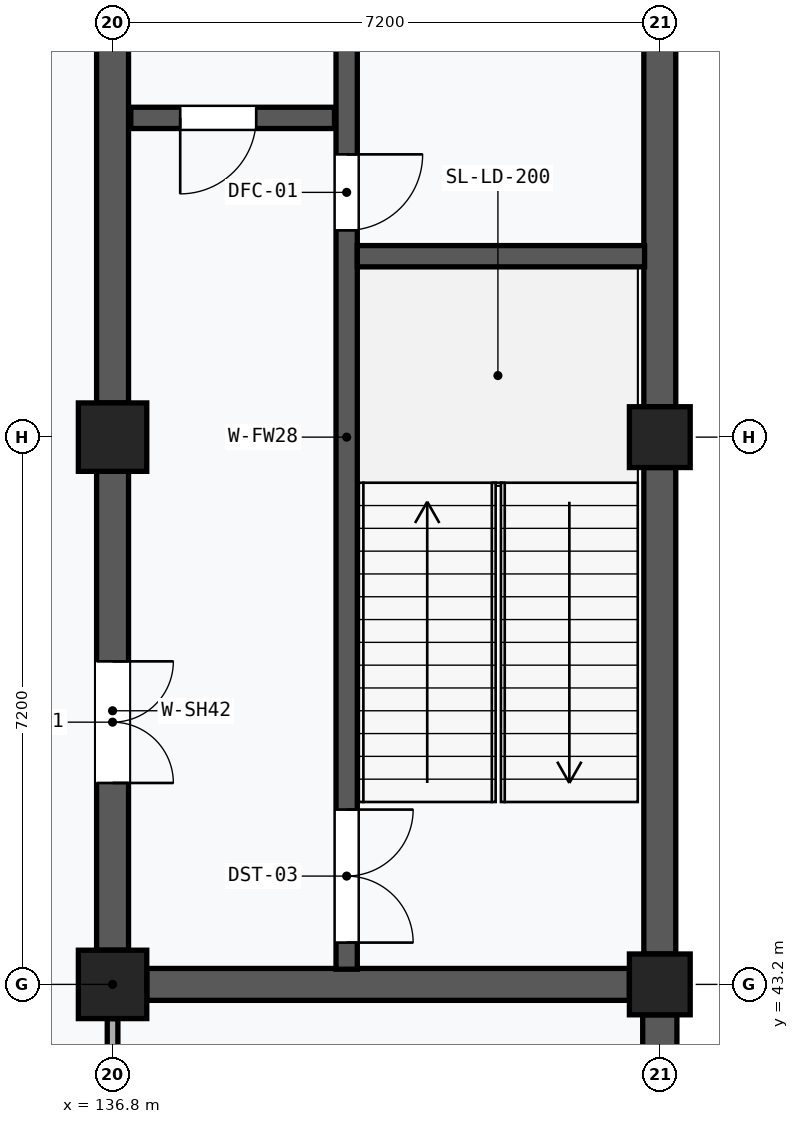
"""IFC4 building model, lengths in metres.
Left out: names, types, materials, properties, quantities, classifications, styles, units other than length and angle.
Written with IfcOpenShell. Run it as: python <this file> out.ifc"""

import sys

from ifc_helpers import new_model, si_unit, direction, frame, frame_2d, origin, origin_2d, place, context, subcontext, project, spatial, rectangle, extrude, element, fill, save


model = new_model("IFC4")
c1 = context("Model", 3, precision=1e-05, world=origin(), true_north=direction((0.0, 1.0)))
c2 = subcontext(c1, "Body", "Model", "MODEL_VIEW")
j1 = project(units=[si_unit("LENGTHUNIT", "METRE"), si_unit("PLANEANGLEUNIT", "RADIAN")], contexts=[c1])
p1 = place(None, origin())
s1 = spatial("IfcSite", under=j1, at=p1, CompositionType="ELEMENT")
p2 = place(p1, origin())
s2 = spatial("IfcBuilding", under=s1, at=p2, CompositionType="ELEMENT")
p3 = place(p2, frame((0.0, 0.0, -4.5)))
s3 = spatial("IfcBuildingStorey", under=s2, at=p3, CompositionType="ELEMENT", Elevation=-4.5)
for number, where, z_axis, x_axis in (
    (1, (136.8, 43.2, 0.0), (0.0, 0.0, 1.0), (1.0, 0.0, 0.0)),
    (2, (136.8, 50.4, 0.0), (0.0, 0.0, 1.0), (1.0, 0.0, 0.0)),
):
    element("IfcColumn", number, at=place(p3, frame(where, z_axis=z_axis, x_axis=x_axis)), inside=s3, PredefinedType="COLUMN", context=c2, shape_type="SweptSolid", body=[
        extrude(rectangle(XDim=0.9, YDim=0.9, at=origin_2d()), origin(), (0.0, 0.0, 1.0), 4.5),
    ])
for number, where, z_axis, x_axis in (
    (3, (144.0, 43.2, 0.0), (0.0, 0.0, 1.0), (1.0, 0.0, 0.0)),
    (4, (144.0, 50.4, 0.0), (0.0, 0.0, 1.0), (1.0, 0.0, 0.0)),
):
    element("IfcColumn", number, at=place(p3, frame(where, z_axis=z_axis, x_axis=x_axis)), inside=s3, PredefinedType="COLUMN", context=c2, shape_type="SweptSolid", body=[
        extrude(rectangle(XDim=0.8, YDim=0.8, at=origin_2d()), origin(), (0.0, 0.0, 1.0), 4.5),
    ])
p4 = place(p3, frame((144.0, 36.4, 0.0), z_axis=(0.0, 0.0, 1.0), x_axis=(0.0, 1.0, 0.0)))
e5 = element("IfcWall", 5, at=p4, inside=s3, PredefinedType="SOLIDWALL", context=c2, shape_type="SweptSolid", body=[
    extrude(rectangle(XDim=6.4, YDim=0.45, at=frame_2d((3.2, 0.0))), origin(), (0.0, 0.0, 1.0), 3.57),
])
p5 = place(p3, frame((136.8, 43.65, 0.0), z_axis=(0.0, 0.0, 1.0), x_axis=(0.0, 1.0, 0.0)))
e6 = element("IfcWall", 6, at=p5, inside=s3, PredefinedType="SHEAR", context=c2, shape_type="SweptSolid", body=[
    extrude(rectangle(XDim=6.3, YDim=0.42, at=frame_2d((3.15, 0.0))), origin(), (0.0, 0.0, 1.0), 3.3),
])
p6 = place(p5, frame((2.2, 0.0, 0.0)))
e7 = element("IfcOpeningElement", 7, at=p6, cuts=e6, PredefinedType="OPENING", context=c2, shape_type="SweptSolid", body=[
    extrude(rectangle(XDim=1.6, YDim=2.2, at=frame_2d((0.8, 1.1))), frame((0.0, 0.222, 0.0), z_axis=(0.0, -1.0, 0.0), x_axis=(1.0, 0.0, 0.0)), (0.0, 0.0, 1.0), 0.444),
])
p7 = place(p3, frame((136.8, 50.85, 0.0), z_axis=(0.0, 0.0, 1.0), x_axis=(0.0, 1.0, 0.0)))
e8 = element("IfcWall", 8, at=p7, inside=s3, PredefinedType="SHEAR", context=c2, shape_type="SweptSolid", body=[
    extrude(rectangle(XDim=6.3, YDim=0.42, at=frame_2d((3.15, 0.0))), origin(), (0.0, 0.0, 1.0), 3.3),
])
for number, where, z_axis, x_axis in (
    (9, (144.0, 43.6, 0.0), (0.0, 0.0, 1.0), (0.0, 1.0, 0.0)),
    (10, (144.0, 50.8, 0.0), (0.0, 0.0, 1.0), (0.0, 1.0, 0.0)),
):
    element("IfcWall", number, at=place(p3, frame(where, z_axis=z_axis, x_axis=x_axis)), inside=s3, PredefinedType="SHEAR", context=c2, shape_type="SweptSolid", body=[
        extrude(rectangle(XDim=6.4, YDim=0.42, at=frame_2d((3.2, 0.0))), origin(), (0.0, 0.0, 1.0), 3.57),
    ])
p8 = place(p3, frame((137.25, 43.2, 0.0), z_axis=(0.0, 0.0, 1.0), x_axis=(1.0, 0.0, 0.0)))
e11 = element("IfcWall", 11, at=p8, inside=s3, PredefinedType="SHEAR", context=c2, shape_type="SweptSolid", body=[
    extrude(rectangle(XDim=6.35, YDim=0.42, at=frame_2d((3.175, 0.0))), origin(), (0.0, 0.0, 1.0), 3.3),
])
p9 = place(p3, frame((139.88, 43.4, 0.0), z_axis=(0.0, 0.0, 1.0), x_axis=(0.0, 1.0, 0.0)))
e12 = element("IfcWall", 12, at=p9, inside=s3, PredefinedType="SHEAR", context=c2, shape_type="SweptSolid", body=[
    extrude(rectangle(XDim=14.0, YDim=0.28, at=frame_2d((7.0, 0.0))), origin(), (0.0, 0.0, 1.0), 4.2),
])
p10 = place(p9, frame((0.35, 0.0, 0.0)))
e13 = element("IfcOpeningElement", 13, at=p10, cuts=e12, PredefinedType="OPENING", context=c2, shape_type="SweptSolid", body=[
    extrude(rectangle(XDim=1.75, YDim=2.15, at=frame_2d((0.875, 1.075))), frame((0.0, 0.152, 0.0), z_axis=(0.0, -1.0, 0.0), x_axis=(1.0, 0.0, 0.0)), (0.0, 0.0, 1.0), 0.304),
])
p11 = place(p9, frame((9.72, 0.0, 0.0)))
e14 = element("IfcOpeningElement", 14, at=p11, cuts=e12, PredefinedType="OPENING", context=c2, shape_type="SweptSolid", body=[
    extrude(rectangle(XDim=1.0, YDim=2.15, at=frame_2d((0.5, 1.075))), frame((0.0, 0.152, 0.0), z_axis=(0.0, -1.0, 0.0), x_axis=(1.0, 0.0, 0.0)), (0.0, 0.0, 1.0), 0.304),
])
p12 = place(p3, frame((140.02, 52.78, 0.0), z_axis=(0.0, 0.0, 1.0), x_axis=(1.0, 0.0, 0.0)))
e15 = element("IfcWall", 15, at=p12, inside=s3, PredefinedType="SHEAR", context=c2, shape_type="SweptSolid", body=[
    extrude(rectangle(XDim=3.78, YDim=0.28, at=frame_2d((1.89, 0.0))), origin(), (0.0, 0.0, 1.0), 4.2),
])
p13 = place(p3, frame((137.04, 54.6, 0.0), z_axis=(0.0, 0.0, 1.0), x_axis=(1.0, 0.0, 0.0)))
e16 = element("IfcWall", 16, at=p13, inside=s3, PredefinedType="SHEAR", context=c2, shape_type="SweptSolid", body=[
    extrude(rectangle(XDim=2.68, YDim=0.28, at=frame_2d((1.34, 0.0))), origin(), (0.0, 0.0, 1.0), 4.2),
])
p14 = place(p13, frame((0.65, 0.0, 0.0)))
e17 = element("IfcOpeningElement", 17, at=p14, cuts=e16, PredefinedType="OPENING", context=c2, shape_type="SweptSolid", body=[
    extrude(rectangle(XDim=1.0, YDim=2.15, at=frame_2d((0.5, 1.075))), frame((0.0, 0.152, 0.0), z_axis=(0.0, -1.0, 0.0), x_axis=(1.0, 0.0, 0.0)), (0.0, 0.0, 1.0), 0.304),
])
p15 = place(p3, frame((136.8, 36.45, 0.0), z_axis=(0.0, 0.0, 1.0), x_axis=(0.0, 1.0, 0.0)))
e18 = element("IfcWall", 18, at=p15, inside=s3, PredefinedType="PARTITIONING", context=c2, shape_type="SweptSolid", body=[
    extrude(rectangle(XDim=6.3, YDim=0.14, at=frame_2d((3.15, 0.0))), origin(), (0.0, 0.0, 1.0), 3.3),
])
p16 = place(p6, frame((1.6, 0.0, 0.0), z_axis=(0.0, 0.0, 1.0), x_axis=(-1.0, 0.0, 0.0)))
e19 = element("IfcDoor", 19, at=p16, inside=s3, OperationType="DOUBLE_DOOR_SINGLE_SWING", PredefinedType="DOOR", context=c2, shape_type="SweptSolid", body=[
    extrude(rectangle(XDim=1.6, YDim=2.2, at=frame_2d((0.8, 1.1))), frame((0.0, 0.025, 0.0), z_axis=(0.0, -1.0, 0.0), x_axis=(1.0, 0.0, 0.0)), (0.0, 0.0, 1.0), 0.05),
])
fill(e7, e19)
p17 = place(p10, frame((1.75, 0.0, 0.0), z_axis=(0.0, 0.0, 1.0), x_axis=(-1.0, 0.0, 0.0)))
e20 = element("IfcDoor", 20, at=p17, inside=s3, OperationType="DOUBLE_DOOR_SINGLE_SWING", PredefinedType="DOOR", context=c2, shape_type="SweptSolid", body=[
    extrude(rectangle(XDim=1.75, YDim=2.15, at=frame_2d((0.875, 1.075))), frame((0.0, 0.025, 0.0), z_axis=(0.0, -1.0, 0.0), x_axis=(1.0, 0.0, 0.0)), (0.0, 0.0, 1.0), 0.05),
])
fill(e13, e20)
p18 = place(p11, frame((1.0, 0.0, 0.0), z_axis=(0.0, 0.0, 1.0), x_axis=(-1.0, 0.0, 0.0)))
e21 = element("IfcDoor", 21, at=p18, inside=s3, OperationType="SINGLE_SWING_LEFT", PredefinedType="DOOR", context=c2, shape_type="SweptSolid", body=[
    extrude(rectangle(XDim=1.0, YDim=2.15, at=frame_2d((0.5, 1.075))), frame((0.0, 0.025, 0.0), z_axis=(0.0, -1.0, 0.0), x_axis=(1.0, 0.0, 0.0)), (0.0, 0.0, 1.0), 0.05),
])
fill(e14, e21)
p19 = place(p14, frame((1.0, 0.0, 0.0), z_axis=(0.0, 0.0, 1.0), x_axis=(-1.0, 0.0, 0.0)))
e22 = element("IfcDoor", 22, at=p19, inside=s3, OperationType="SINGLE_SWING_RIGHT", PredefinedType="DOOR", context=c2, shape_type="SweptSolid", body=[
    extrude(rectangle(XDim=1.0, YDim=2.15, at=frame_2d((0.5, 1.075))), frame((0.0, 0.025, 0.0), z_axis=(0.0, -1.0, 0.0), x_axis=(1.0, 0.0, 0.0)), (0.0, 0.0, 1.0), 0.05),
])
fill(e17, e22)
save(model, sys.argv[1])
